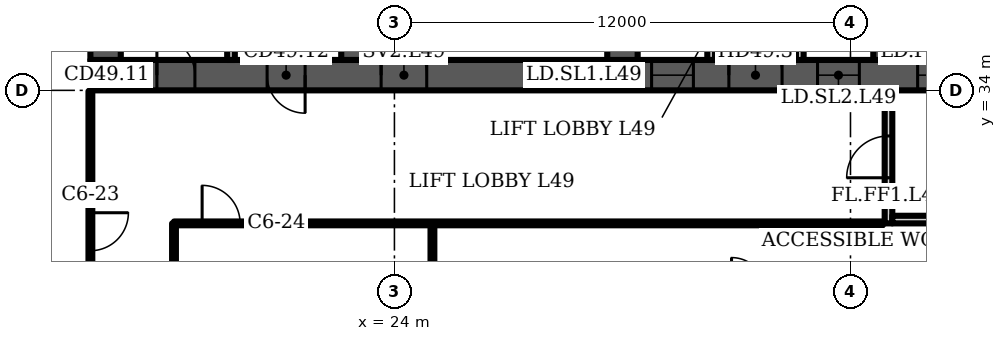
"""IFC4 building model, lengths in metres.
Left out: names, types, materials, properties, quantities, classifications, styles, units other than length and angle.
Written with IfcOpenShell. Run it as: python <this file> out.ifc"""

import sys

from ifc_helpers import new_model, si_unit, direction, frame, frame_2d, origin, place, context, subcontext, project, spatial, polyline, rectangle, outline, extrude, element, fill, save


model = new_model("IFC4")
c1 = context("Model", 3, precision=1e-05, world=origin(), true_north=direction((0.0, 1.0)))
c2 = subcontext(c1, "Body", "Model", "MODEL_VIEW")
j1 = project(units=[si_unit("LENGTHUNIT", "METRE"), si_unit("PLANEANGLEUNIT", "RADIAN")], contexts=[c1])
p1 = place(None, origin())
s1 = spatial("IfcSite", under=j1, at=p1, CompositionType="ELEMENT")
p2 = place(p1, origin())
s2 = spatial("IfcBuilding", under=s1, at=p2, CompositionType="ELEMENT")
p3 = place(p2, frame((0.0, 0.0, 198.7)))
s3 = spatial("IfcBuildingStorey", under=s2, at=p3, CompositionType="ELEMENT", Elevation=198.7)
p4 = place(p3, frame((16.0, 34.4, 0.0), z_axis=(0.0, 0.0, 1.0), x_axis=(1.0, 0.0, 0.0)))
e1 = element("IfcWall", 1, at=p4, inside=s3, PredefinedType="SHEAR", context=c2, shape_type="SweptSolid", body=[
    extrude(rectangle(XDim=42.0, YDim=0.8, at=frame_2d((21.0, 0.0))), origin(), (0.0, 0.0, 1.0), 3.6),
])
p5 = place(p4, frame((1.75, 0.0, 0.0)))
e2 = element("IfcOpeningElement", 2, at=p5, cuts=e1, PredefinedType="OPENING", context=c2, shape_type="SweptSolid", body=[
    extrude(rectangle(XDim=1.0, YDim=2.1, at=frame_2d((0.5, 1.05))), frame((0.0, 0.41, 0.0), z_axis=(0.0, -1.0, 0.0), x_axis=(1.0, 0.0, 0.0)), (0.0, 0.0, 1.0), 0.82),
])
p6 = place(p4, frame((4.65, 0.0, 0.0)))
e3 = element("IfcOpeningElement", 3, at=p6, cuts=e1, PredefinedType="OPENING", context=c2, shape_type="SweptSolid", body=[
    extrude(rectangle(XDim=1.0, YDim=2.1, at=frame_2d((0.5, 1.05))), frame((0.0, 0.41, 0.0), z_axis=(0.0, -1.0, 0.0), x_axis=(1.0, 0.0, 0.0)), (0.0, 0.0, 1.0), 0.82),
])
p7 = place(p4, frame((7.65, 0.0, 0.0)))
e4 = element("IfcOpeningElement", 4, at=p7, cuts=e1, PredefinedType="OPENING", context=c2, shape_type="SweptSolid", body=[
    extrude(rectangle(XDim=1.2, YDim=2.1, at=frame_2d((0.6, 1.05))), frame((0.0, 0.41, 0.0), z_axis=(0.0, -1.0, 0.0), x_axis=(1.0, 0.0, 0.0)), (0.0, 0.0, 1.0), 0.82),
])
p8 = place(p4, frame((14.767, 0.0, 0.0)))
e5 = element("IfcOpeningElement", 5, at=p8, cuts=e1, PredefinedType="OPENING", context=c2, shape_type="SweptSolid", body=[
    extrude(rectangle(XDim=1.1, YDim=2.1, at=frame_2d((0.55, 1.05))), frame((0.0, 0.41, 0.0), z_axis=(0.0, -1.0, 0.0), x_axis=(1.0, 0.0, 0.0)), (0.0, 0.0, 1.0), 0.82),
])
p9 = place(p4, frame((19.133, 0.0, 0.0)))
e6 = element("IfcOpeningElement", 6, at=p9, cuts=e1, PredefinedType="OPENING", context=c2, shape_type="SweptSolid", body=[
    extrude(rectangle(XDim=1.1, YDim=2.1, at=frame_2d((0.55, 1.05))), frame((0.0, 0.41, 0.0), z_axis=(0.0, -1.0, 0.0), x_axis=(1.0, 0.0, 0.0)), (0.0, 0.0, 1.0), 0.82),
])
p10 = place(p4, frame((16.8, 0.0, 0.0)))
e7 = element("IfcOpeningElement", 7, at=p10, cuts=e1, PredefinedType="OPENING", context=c2, shape_type="SweptSolid", body=[
    extrude(rectangle(XDim=1.4, YDim=2.1, at=frame_2d((0.7, 1.05))), frame((0.0, 0.41, 0.0), z_axis=(0.0, -1.0, 0.0), x_axis=(1.0, 0.0, 0.0)), (0.0, 0.0, 1.0), 0.82),
])
p11 = place(p4, frame((21.767, 0.0, 0.0)))
e8 = element("IfcOpeningElement", 8, at=p11, cuts=e1, PredefinedType="OPENING", context=c2, shape_type="SweptSolid", body=[
    extrude(rectangle(XDim=1.1, YDim=2.1, at=frame_2d((0.55, 1.05))), frame((0.0, 0.41, 0.0), z_axis=(0.0, -1.0, 0.0), x_axis=(1.0, 0.0, 0.0)), (0.0, 0.0, 1.0), 0.82),
])
p12 = place(p4, frame((23.95, 0.0, 0.0)))
e9 = element("IfcOpeningElement", 9, at=p12, cuts=e1, PredefinedType="OPENING", context=c2, shape_type="SweptSolid", body=[
    extrude(rectangle(XDim=1.1, YDim=2.1, at=frame_2d((0.55, 1.05))), frame((0.0, 0.41, 0.0), z_axis=(0.0, -1.0, 0.0), x_axis=(1.0, 0.0, 0.0)), (0.0, 0.0, 1.0), 0.82),
])
p13 = place(p4, frame((26.133, 0.0, 0.0)))
e10 = element("IfcOpeningElement", 10, at=p13, cuts=e1, PredefinedType="OPENING", context=c2, shape_type="SweptSolid", body=[
    extrude(rectangle(XDim=1.1, YDim=2.1, at=frame_2d((0.55, 1.05))), frame((0.0, 0.41, 0.0), z_axis=(0.0, -1.0, 0.0), x_axis=(1.0, 0.0, 0.0)), (0.0, 0.0, 1.0), 0.82),
])
p14 = place(p4, frame((33.15, 0.0, 0.0)))
e11 = element("IfcOpeningElement", 11, at=p14, cuts=e1, PredefinedType="OPENING", context=c2, shape_type="SweptSolid", body=[
    extrude(rectangle(XDim=1.2, YDim=2.1, at=frame_2d((0.6, 1.05))), frame((0.0, 0.41, 0.0), z_axis=(0.0, -1.0, 0.0), x_axis=(1.0, 0.0, 0.0)), (0.0, 0.0, 1.0), 0.82),
])
p15 = place(p4, frame((35.817, 0.0, 0.0)))
e12 = element("IfcOpeningElement", 12, at=p15, cuts=e1, PredefinedType="OPENING", context=c2, shape_type="SweptSolid", body=[
    extrude(rectangle(XDim=1.0, YDim=2.1, at=frame_2d((0.5, 1.05))), frame((0.0, 0.41, 0.0), z_axis=(0.0, -1.0, 0.0), x_axis=(1.0, 0.0, 0.0)), (0.0, 0.0, 1.0), 0.82),
])
p16 = place(p4, frame((39.95, 0.0, 0.0)))
e13 = element("IfcOpeningElement", 13, at=p16, cuts=e1, PredefinedType="OPENING", context=c2, shape_type="SweptSolid", body=[
    extrude(rectangle(XDim=1.0, YDim=2.1, at=frame_2d((0.5, 1.05))), frame((0.0, 0.41, 0.0), z_axis=(0.0, -1.0, 0.0), x_axis=(1.0, 0.0, 0.0)), (0.0, 0.0, 1.0), 0.82),
])
p17 = place(p4, frame((37.767, 0.0, 0.0)))
e14 = element("IfcOpeningElement", 14, at=p17, cuts=e1, PredefinedType="OPENING", context=c2, shape_type="SweptSolid", body=[
    extrude(rectangle(XDim=1.4, YDim=2.1, at=frame_2d((0.7, 1.05))), frame((0.0, 0.41, 0.0), z_axis=(0.0, -1.0, 0.0), x_axis=(1.0, 0.0, 0.0)), (0.0, 0.0, 1.0), 0.82),
])
p18 = place(p3, frame((16.4, 34.8, 0.0), z_axis=(0.0, 0.0, 1.0), x_axis=(0.0, 1.0, 0.0)))
e15 = element("IfcWall", 15, at=p18, inside=s3, PredefinedType="SHEAR", context=c2, shape_type="SweptSolid", body=[
    extrude(rectangle(XDim=13.184, YDim=0.8, at=frame_2d((6.592, 0.0))), origin(), (0.0, 0.0, 1.0), 3.6),
])
p19 = place(p3, frame((23.0, 34.8, 0.0), z_axis=(0.0, 0.0, 1.0), x_axis=(0.0, 1.0, 0.0)))
e16 = element("IfcWall", 16, at=p19, inside=s3, PredefinedType="SHEAR", context=c2, shape_type="SweptSolid", body=[
    extrude(rectangle(XDim=13.762, YDim=0.8, at=frame_2d((6.881, 0.0))), origin(), (0.0, 0.0, 1.0), 3.6),
])
p20 = place(p19, frame((10.0, 0.0, 0.0)))
e17 = element("IfcOpeningElement", 17, at=p20, cuts=e16, PredefinedType="OPENING", context=c2, shape_type="SweptSolid", body=[
    extrude(rectangle(XDim=1.0, YDim=2.1, at=frame_2d((0.5, 1.05))), frame((0.0, 0.41, 0.0), z_axis=(0.0, -1.0, 0.0), x_axis=(1.0, 0.0, 0.0)), (0.0, 0.0, 1.0), 0.82),
])
p21 = place(p3, frame((30.0, 34.8, 0.0), z_axis=(0.0, 0.0, 1.0), x_axis=(0.0, 1.0, 0.0)))
e18 = element("IfcWall", 18, at=p21, inside=s3, PredefinedType="SHEAR", context=c2, shape_type="SweptSolid", body=[
    extrude(rectangle(XDim=14.374, YDim=0.8, at=frame_2d((7.187, 0.0))), origin(), (0.0, 0.0, 1.0), 3.6),
])
p22 = place(p21, frame((3.6, 0.0, 0.0)))
e19 = element("IfcOpeningElement", 19, at=p22, cuts=e18, PredefinedType="OPENING", context=c2, shape_type="SweptSolid", body=[
    extrude(rectangle(XDim=1.1, YDim=2.1, at=frame_2d((0.55, 1.05))), frame((0.0, 0.41, 0.0), z_axis=(0.0, -1.0, 0.0), x_axis=(1.0, 0.0, 0.0)), (0.0, 0.0, 1.0), 0.82),
])
p23 = place(p3, frame((37.0, 34.8, 0.0), z_axis=(0.0, 0.0, 1.0), x_axis=(0.0, 1.0, 0.0)))
e20 = element("IfcWall", 20, at=p23, inside=s3, PredefinedType="SHEAR", context=c2, shape_type="SweptSolid", body=[
    extrude(rectangle(XDim=14.987, YDim=0.8, at=frame_2d((7.493, 0.0))), origin(), (0.0, 0.0, 1.0), 3.6),
])
p24 = place(p23, frame((11.312, 0.0, 0.0)))
e21 = element("IfcOpeningElement", 21, at=p24, cuts=e20, PredefinedType="OPENING", context=c2, shape_type="SweptSolid", body=[
    extrude(rectangle(XDim=1.0, YDim=2.1, at=frame_2d((0.5, 1.05))), frame((0.0, 0.41, 0.0), z_axis=(0.0, -1.0, 0.0), x_axis=(1.0, 0.0, 0.0)), (0.0, 0.0, 1.0), 0.82),
])
p25 = place(p23, frame((3.6, 0.0, 0.0)))
e22 = element("IfcOpeningElement", 22, at=p25, cuts=e20, PredefinedType="OPENING", context=c2, shape_type="SweptSolid", body=[
    extrude(rectangle(XDim=1.1, YDim=2.1, at=frame_2d((0.55, 1.05))), frame((0.0, 0.41, 0.0), z_axis=(0.0, -1.0, 0.0), x_axis=(1.0, 0.0, 0.0)), (0.0, 0.0, 1.0), 0.82),
])
p26 = place(p3, frame((19.7, 34.8, 0.0), z_axis=(0.0, 0.0, 1.0), x_axis=(0.0, 1.0, 0.0)))
e23 = element("IfcWall", 23, at=p26, inside=s3, PredefinedType="PARTITIONING", context=c2, shape_type="SweptSolid", body=[
    extrude(rectangle(XDim=13.234, YDim=0.2, at=frame_2d((6.617, 0.0))), origin(), (0.0, 0.0, 1.0), 3.15),
])
p27 = place(p3, origin())
e24 = element("IfcWall", 24, at=p27, inside=s3, PredefinedType="PARTITIONING", context=c2, shape_type="SweptSolid", body=[
    extrude(outline(polyline([(32.233, 37.65), (30.4, 37.65), (30.4, 37.85), (32.233, 37.85), (32.433, 37.85), (32.433, 34.8), (32.233, 34.8), (32.233, 37.65)])), origin(), (0.0, 0.0, 1.0), 3.15),
])
p28 = place(p3, origin())
e25 = element("IfcWall", 25, at=p28, inside=s3, PredefinedType="PARTITIONING", context=c2, shape_type="SweptSolid", body=[
    extrude(outline(polyline([(34.567, 37.85), (34.767, 37.85), (36.6, 37.85), (36.6, 37.65), (34.767, 37.65), (34.767, 34.8), (34.567, 34.8), (34.567, 37.85)])), origin(), (0.0, 0.0, 1.0), 3.15),
])
p29 = place(p3, origin())
e26 = element("IfcWall", 26, at=p29, inside=s3, PredefinedType="PARTITIONING", context=c2, shape_type="SweptSolid", body=[
    extrude(outline(polyline([(41.567, 37.1), (39.433, 37.1), (39.433, 34.8), (39.233, 34.8), (39.233, 37.65), (37.4, 37.65), (37.4, 37.85), (39.233, 37.85), (39.433, 37.85), (39.433, 37.3), (41.567, 37.3), (41.567, 37.55), (41.767, 37.55), (43.6, 37.55), (43.6, 37.35), (41.767, 37.35), (41.767, 34.8), (41.567, 34.8), (41.567, 37.1)])), origin(), (0.0, 0.0, 1.0), 3.15),
])
p30 = place(p3, frame((37.0, 30.5, 0.0), z_axis=(0.0, 0.0, 1.0), x_axis=(0.0, 1.0, 0.0)))
e27 = element("IfcWall", 27, at=p30, inside=s3, PredefinedType="PARTITIONING", context=c2, shape_type="SweptSolid", body=[
    extrude(rectangle(XDim=3.5, YDim=0.2, at=frame_2d((1.75, 0.0))), origin(), (0.0, 0.0, 1.0), 3.15),
])
p31 = place(p30, frame((1.2, 0.0, 0.0)))
e28 = element("IfcOpeningElement", 28, at=p31, cuts=e27, PredefinedType="OPENING", context=c2, shape_type="SweptSolid", body=[
    extrude(rectangle(XDim=1.1, YDim=2.1, at=frame_2d((0.55, 1.05))), frame((0.0, 0.11, 0.0), z_axis=(0.0, -1.0, 0.0), x_axis=(1.0, 0.0, 0.0)), (0.0, 0.0, 1.0), 0.22),
])
p32 = place(p3, frame((37.1, 30.6, 0.0), z_axis=(0.0, 0.0, 1.0), x_axis=(1.0, 0.0, 0.0)))
e29 = element("IfcWall", 29, at=p32, inside=s3, PredefinedType="PARTITIONING", context=c2, shape_type="SweptSolid", body=[
    extrude(rectangle(XDim=2.8, YDim=0.2, at=frame_2d((1.4, 0.0))), origin(), (0.0, 0.0, 1.0), 3.15),
])
p33 = place(p3, frame((16.0, 26.45, 0.0), z_axis=(0.0, 0.0, 1.0), x_axis=(0.0, 1.0, 0.0)))
e30 = element("IfcWall", 30, at=p33, inside=s3, PredefinedType="PARTITIONING", context=c2, shape_type="SweptSolid", body=[
    extrude(rectangle(XDim=7.53, YDim=0.1, at=frame_2d((3.765, 0.0))), origin(), (0.0, 0.0, 1.0), 3.15),
])
p34 = place(p33, frame((3.33, 0.0, 0.0)))
e31 = element("IfcOpeningElement", 31, at=p34, cuts=e30, PredefinedType="OPENING", context=c2, shape_type="SweptSolid", body=[
    extrude(rectangle(XDim=1.0, YDim=2.1, at=frame_2d((0.5, 1.05))), frame((0.0, 0.06, 0.0), z_axis=(0.0, -1.0, 0.0), x_axis=(1.0, 0.0, 0.0)), (0.0, 0.0, 1.0), 0.12),
])
p35 = place(p3, frame((18.2, 26.06, 0.0), z_axis=(0.0, 0.0, 1.0), x_axis=(0.0, 1.0, 0.0)))
e32 = element("IfcWall", 32, at=p35, inside=s3, PredefinedType="PARTITIONING", context=c2, shape_type="SweptSolid", body=[
    extrude(rectangle(XDim=4.44, YDim=0.1, at=frame_2d((2.22, 0.0))), origin(), (0.0, 0.0, 1.0), 3.15),
])
p36 = place(p3, frame((18.2, 30.5, 0.0), z_axis=(0.0, 0.0, 1.0), x_axis=(1.0, 0.0, 0.0)))
e33 = element("IfcWall", 33, at=p36, inside=s3, PredefinedType="PARTITIONING", context=c2, shape_type="SweptSolid", body=[
    extrude(rectangle(XDim=18.65, YDim=0.1, at=frame_2d((9.325, 0.0))), origin(), (0.0, 0.0, 1.0), 3.15),
])
p37 = place(p36, frame((0.74, 0.0, 0.0)))
e34 = element("IfcOpeningElement", 34, at=p37, cuts=e33, PredefinedType="OPENING", context=c2, shape_type="SweptSolid", body=[
    extrude(rectangle(XDim=1.0, YDim=2.1, at=frame_2d((0.5, 1.05))), frame((0.0, 0.06, 0.0), z_axis=(0.0, -1.0, 0.0), x_axis=(1.0, 0.0, 0.0)), (0.0, 0.0, 1.0), 0.12),
])
p38 = place(p3, frame((25.0, 22.34, 0.0), z_axis=(0.0, 0.0, 1.0), x_axis=(0.0, 1.0, 0.0)))
e35 = element("IfcWall", 35, at=p38, inside=s3, PredefinedType="PARTITIONING", context=c2, shape_type="SweptSolid", body=[
    extrude(rectangle(XDim=8.16, YDim=0.1, at=frame_2d((4.08, 0.0))), origin(), (0.0, 0.0, 1.0), 3.15),
])
p39 = place(p5, origin())
e36 = element("IfcDoor", 36, at=p39, inside=s3, OperationType="SINGLE_SWING_LEFT", PredefinedType="DOOR", context=c2, shape_type="SweptSolid", body=[
    extrude(rectangle(XDim=1.0, YDim=2.1, at=frame_2d((0.5, 1.05))), frame((0.0, 0.4, 0.0), z_axis=(0.0, -1.0, 0.0), x_axis=(1.0, 0.0, 0.0)), (0.0, 0.0, 1.0), 0.8),
])
fill(e2, e36)
p40 = place(p6, origin())
e37 = element("IfcDoor", 37, at=p40, inside=s3, OperationType="SINGLE_SWING_RIGHT", PredefinedType="DOOR", context=c2, shape_type="SweptSolid", body=[
    extrude(rectangle(XDim=1.0, YDim=2.1, at=frame_2d((0.5, 1.05))), frame((0.0, 0.4, 0.0), z_axis=(0.0, -1.0, 0.0), x_axis=(1.0, 0.0, 0.0)), (0.0, 0.0, 1.0), 0.8),
])
fill(e3, e37)
p41 = place(p7, origin())
e38 = element("IfcDoor", 38, at=p41, inside=s3, OperationType="SINGLE_SWING_LEFT", PredefinedType="DOOR", context=c2, shape_type="SweptSolid", body=[
    extrude(rectangle(XDim=1.2, YDim=2.1, at=frame_2d((0.6, 1.05))), frame((0.0, 0.025, 0.0), z_axis=(0.0, -1.0, 0.0), x_axis=(1.0, 0.0, 0.0)), (0.0, 0.0, 1.0), 0.05),
])
fill(e4, e38)
p42 = place(p8, origin())
e39 = element("IfcDoor", 39, at=p42, inside=s3, OperationType="DOUBLE_DOOR_SLIDING", PredefinedType="DOOR", context=c2, shape_type="SweptSolid", body=[
    extrude(rectangle(XDim=1.1, YDim=2.1, at=frame_2d((0.55, 1.05))), frame((0.0, 0.025, 0.0), z_axis=(0.0, -1.0, 0.0), x_axis=(1.0, 0.0, 0.0)), (0.0, 0.0, 1.0), 0.05),
])
fill(e5, e39)
p43 = place(p9, origin())
e40 = element("IfcDoor", 40, at=p43, inside=s3, OperationType="DOUBLE_DOOR_SLIDING", PredefinedType="DOOR", context=c2, shape_type="SweptSolid", body=[
    extrude(rectangle(XDim=1.1, YDim=2.1, at=frame_2d((0.55, 1.05))), frame((0.0, 0.025, 0.0), z_axis=(0.0, -1.0, 0.0), x_axis=(1.0, 0.0, 0.0)), (0.0, 0.0, 1.0), 0.05),
])
fill(e6, e40)
p44 = place(p10, origin())
e41 = element("IfcDoor", 41, at=p44, inside=s3, OperationType="DOUBLE_DOOR_SINGLE_SWING", PredefinedType="DOOR", context=c2, shape_type="SweptSolid", body=[
    extrude(rectangle(XDim=1.4, YDim=2.1, at=frame_2d((0.7, 1.05))), frame((0.0, 0.025, 0.0), z_axis=(0.0, -1.0, 0.0), x_axis=(1.0, 0.0, 0.0)), (0.0, 0.0, 1.0), 0.05),
])
fill(e7, e41)
p45 = place(p11, origin())
e42 = element("IfcDoor", 42, at=p45, inside=s3, OperationType="DOUBLE_DOOR_SLIDING", PredefinedType="DOOR", context=c2, shape_type="SweptSolid", body=[
    extrude(rectangle(XDim=1.1, YDim=2.1, at=frame_2d((0.55, 1.05))), frame((0.0, 0.025, 0.0), z_axis=(0.0, -1.0, 0.0), x_axis=(1.0, 0.0, 0.0)), (0.0, 0.0, 1.0), 0.05),
])
fill(e8, e42)
p46 = place(p31, origin())
e43 = element("IfcDoor", 43, at=p46, inside=s3, OperationType="SINGLE_SWING_LEFT", PredefinedType="DOOR", context=c2, shape_type="SweptSolid", body=[
    extrude(rectangle(XDim=1.1, YDim=2.1, at=frame_2d((0.55, 1.05))), frame((0.0, 0.025, 0.0), z_axis=(0.0, -1.0, 0.0), x_axis=(1.0, 0.0, 0.0)), (0.0, 0.0, 1.0), 0.05),
])
fill(e28, e43)
p47 = place(p34, origin())
e44 = element("IfcDoor", 44, at=p47, inside=s3, OperationType="SINGLE_SWING_RIGHT", PredefinedType="DOOR", context=c2, shape_type="SweptSolid", body=[
    extrude(rectangle(XDim=1.0, YDim=2.1, at=frame_2d((0.5, 1.05))), frame((0.0, 0.025, 0.0), z_axis=(0.0, -1.0, 0.0), x_axis=(1.0, 0.0, 0.0)), (0.0, 0.0, 1.0), 0.05),
])
fill(e31, e44)
p48 = place(p37, origin())
e45 = element("IfcDoor", 45, at=p48, inside=s3, OperationType="SINGLE_SWING_LEFT", PredefinedType="DOOR", context=c2, shape_type="SweptSolid", body=[
    extrude(rectangle(XDim=1.0, YDim=2.1, at=frame_2d((0.5, 1.05))), frame((0.0, 0.025, 0.0), z_axis=(0.0, -1.0, 0.0), x_axis=(1.0, 0.0, 0.0)), (0.0, 0.0, 1.0), 0.05),
])
fill(e34, e45)
save(model, sys.argv[1])
